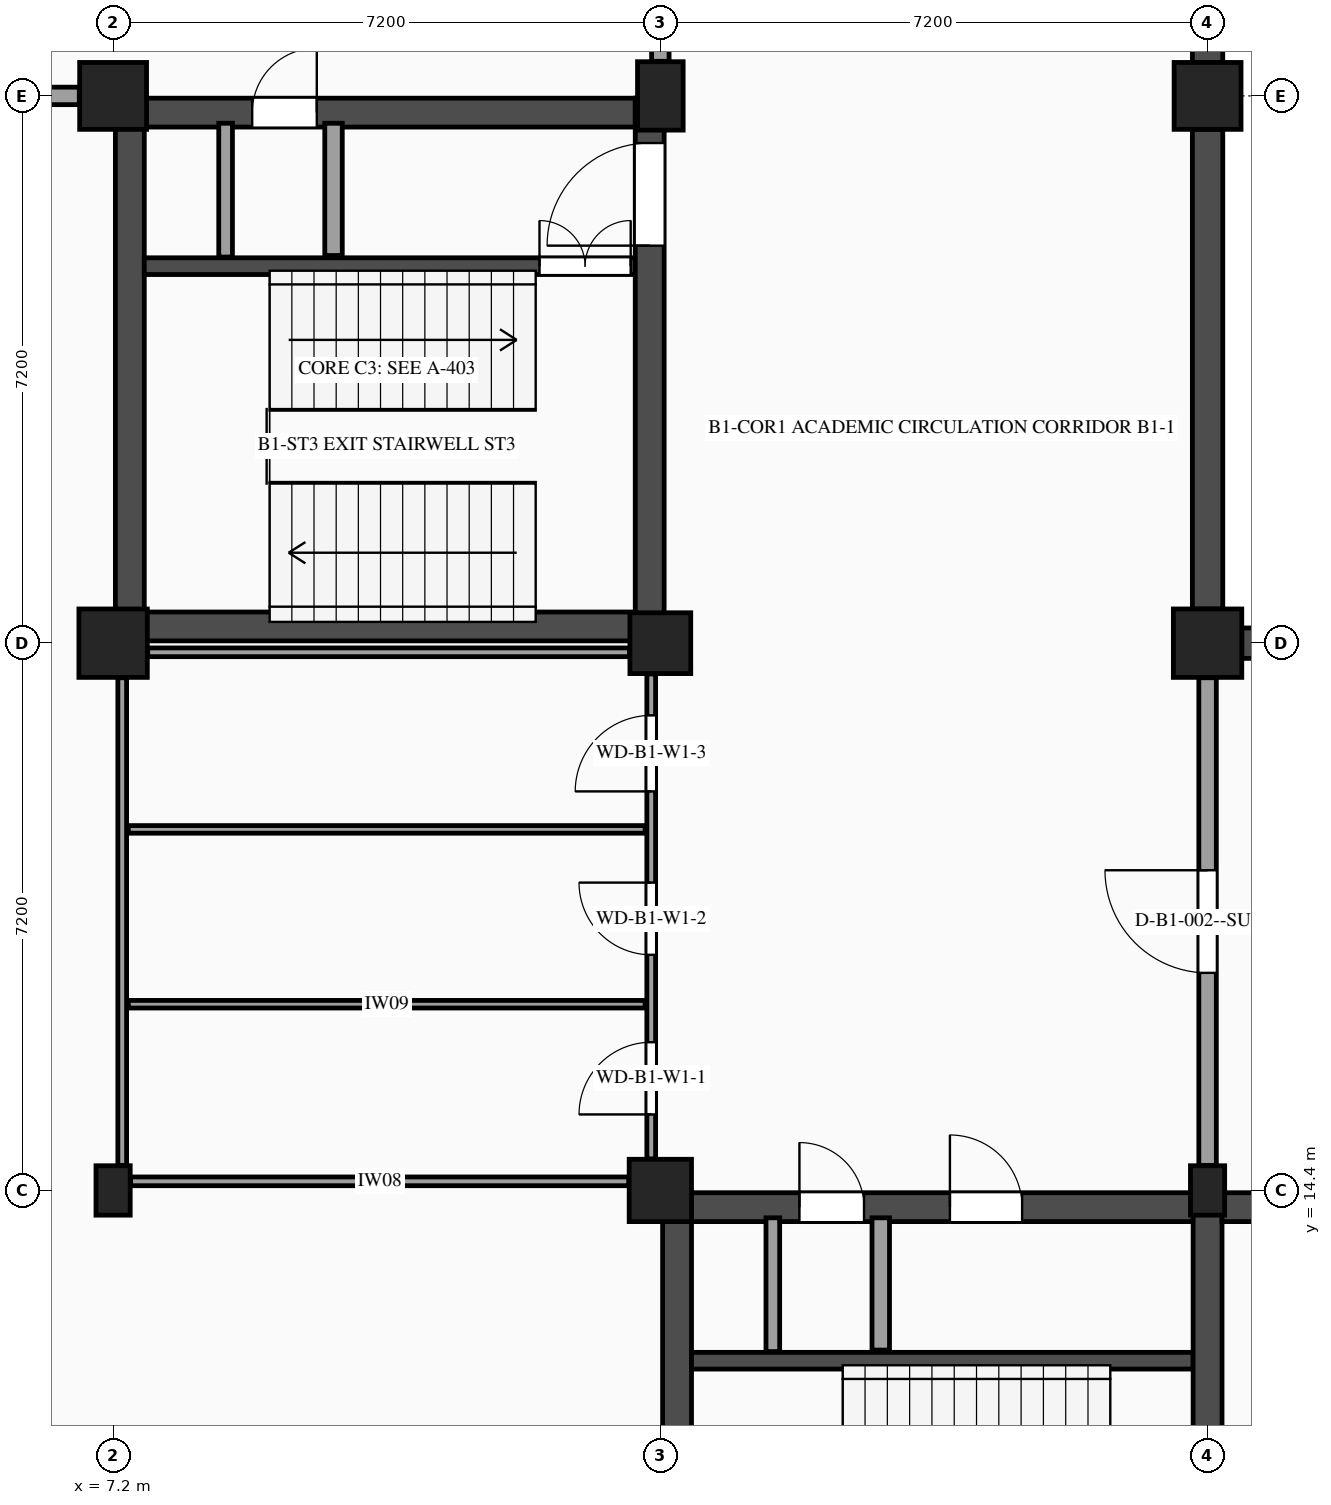
"""IFC4 building model, lengths in metres.
Left out: names, types, materials, properties, quantities, classifications, styles, units other than length and angle.
Written with IfcOpenShell. Run it as: python <this file> out.ifc"""

import sys

from ifc_helpers import new_model, si_unit, direction, frame, frame_2d, origin, origin_2d, place, context, subcontext, project, spatial, rectangle, extrude, element, fill, save


model = new_model("IFC4")
c1 = context("Model", 3, precision=1e-05, world=origin(), true_north=direction((0.0, 1.0)))
c2 = subcontext(c1, "Body", "Model", "MODEL_VIEW")
j1 = project(units=[si_unit("LENGTHUNIT", "METRE"), si_unit("PLANEANGLEUNIT", "RADIAN")], contexts=[c1])
p1 = place(None, origin())
s1 = spatial("IfcSite", under=j1, at=p1, CompositionType="ELEMENT")
p2 = place(p1, origin())
s2 = spatial("IfcBuilding", under=s1, at=p2, CompositionType="ELEMENT")
p3 = place(p2, frame((0.0, 0.0, -4.5)))
s3 = spatial("IfcBuildingStorey", under=s2, at=p3, CompositionType="ELEMENT", Elevation=-4.5)
p4 = place(p3, frame((7.2, 14.4, -0.45), z_axis=(0.0, 0.0, 1.0), x_axis=(1.0, 0.0, 0.0)))
e1 = element("IfcColumn", 1, at=p4, inside=s3, PredefinedType="PILASTER", context=c2, shape_type="SweptSolid", body=[
    extrude(rectangle(XDim=0.45, YDim=0.65, at=origin_2d()), origin(), (0.0, 0.0, 1.0), 4.95),
])
p5 = place(p3, frame((7.2, 21.6, -0.45), z_axis=(0.0, 0.0, 1.0), x_axis=(1.0, 0.0, 0.0)))
e2 = element("IfcColumn", 2, at=p5, inside=s3, PredefinedType="COLUMN", context=c2, shape_type="SweptSolid", body=[
    extrude(rectangle(XDim=0.9, YDim=0.9, at=origin_2d()), origin(), (0.0, 0.0, 1.0), 4.95),
])
p6 = place(p3, frame((7.2, 28.8, -0.45), z_axis=(0.0, 0.0, 1.0), x_axis=(1.0, 0.0, 0.0)))
e3 = element("IfcColumn", 3, at=p6, inside=s3, PredefinedType="COLUMN", context=c2, shape_type="SweptSolid", body=[
    extrude(rectangle(XDim=0.88, YDim=0.88, at=origin_2d()), origin(), (0.0, 0.0, 1.0), 4.95),
])
p7 = place(p3, frame((14.4, 14.4, -0.45), z_axis=(0.0, 0.0, 1.0), x_axis=(1.0, 0.0, 0.0)))
e4 = element("IfcColumn", 4, at=p7, inside=s3, PredefinedType="COLUMN", context=c2, shape_type="SweptSolid", body=[
    extrude(rectangle(XDim=0.82, YDim=0.82, at=origin_2d()), origin(), (0.0, 0.0, 1.0), 4.95),
])
p8 = place(p3, frame((14.4, 21.6, -0.45), z_axis=(0.0, 0.0, 1.0), x_axis=(1.0, 0.0, 0.0)))
e5 = element("IfcColumn", 5, at=p8, inside=s3, PredefinedType="COLUMN", context=c2, shape_type="SweptSolid", body=[
    extrude(rectangle(XDim=0.8, YDim=0.8, at=origin_2d()), origin(), (0.0, 0.0, 1.0), 4.95),
])
p9 = place(p3, frame((14.4, 28.8, -0.45), z_axis=(0.0, 0.0, 1.0), x_axis=(1.0, 0.0, 0.0)))
e6 = element("IfcColumn", 6, at=p9, inside=s3, PredefinedType="COLUMN", context=c2, shape_type="SweptSolid", body=[
    extrude(rectangle(XDim=0.6, YDim=0.9, at=origin_2d()), origin(), (0.0, 0.0, 1.0), 4.95),
])
p10 = place(p3, frame((21.6, 14.4, -0.45), z_axis=(0.0, 0.0, 1.0), x_axis=(1.0, 0.0, 0.0)))
e7 = element("IfcColumn", 7, at=p10, inside=s3, PredefinedType="PILASTER", context=c2, shape_type="SweptSolid", body=[
    extrude(rectangle(XDim=0.45, YDim=0.65, at=origin_2d()), origin(), (0.0, 0.0, 1.0), 4.95),
])
p11 = place(p3, frame((21.6, 21.6, -0.45), z_axis=(0.0, 0.0, 1.0), x_axis=(1.0, 0.0, 0.0)))
e8 = element("IfcColumn", 8, at=p11, inside=s3, PredefinedType="COLUMN", context=c2, shape_type="SweptSolid", body=[
    extrude(rectangle(XDim=0.9, YDim=0.9, at=origin_2d()), origin(), (0.0, 0.0, 1.0), 4.95),
])
p12 = place(p3, frame((21.6, 28.8, -0.45), z_axis=(0.0, 0.0, 1.0), x_axis=(1.0, 0.0, 0.0)))
e9 = element("IfcColumn", 9, at=p12, inside=s3, PredefinedType="COLUMN", context=c2, shape_type="SweptSolid", body=[
    extrude(rectangle(XDim=0.88, YDim=0.88, at=origin_2d()), origin(), (0.0, 0.0, 1.0), 4.95),
])
p13 = place(p3, frame((21.6, 35.59, 0.0), z_axis=(0.0, 0.0, 1.0), x_axis=(0.0, -1.0, 0.0)))
e10 = element("IfcWall", 10, at=p13, inside=s3, PredefinedType="SOLIDWALL", context=c2, shape_type="SweptSolid", body=[
    extrude(rectangle(XDim=6.35, YDim=0.4, at=frame_2d((3.175, 0.0))), origin(), (0.0, 0.0, 1.0), 4.17),
])
p14 = place(p3, frame((21.6, 28.36, 0.0), z_axis=(0.0, 0.0, 1.0), x_axis=(0.0, -1.0, 0.0)))
e11 = element("IfcWall", 11, at=p14, inside=s3, PredefinedType="SOLIDWALL", context=c2, shape_type="SweptSolid", body=[
    extrude(rectangle(XDim=6.31, YDim=0.4, at=frame_2d((3.155, 0.0))), origin(), (0.0, 0.0, 1.0), 4.17),
])
p15 = place(p3, frame((22.05, 21.6, 0.0), z_axis=(0.0, 0.0, 1.0), x_axis=(1.0, 0.0, 0.0)))
e12 = element("IfcWall", 12, at=p15, inside=s3, PredefinedType="SOLIDWALL", context=c2, shape_type="SweptSolid", body=[
    extrude(rectangle(XDim=6.35, YDim=0.4, at=frame_2d((3.175, 0.0))), origin(), (0.0, 0.0, 1.0), 4.17),
])
p16 = place(p3, frame((14.62, 14.37, 0.0), z_axis=(0.0, 0.0, 1.0), x_axis=(0.0, -1.0, 0.0)))
e13 = element("IfcWall", 13, at=p16, inside=s3, PredefinedType="SHEAR", context=c2, shape_type="SweptSolid", body=[
    extrude(rectangle(XDim=7.14, YDim=0.38, at=frame_2d((3.57, 0.0))), origin(), (0.0, 0.0, 1.0), 4.17),
])
p17 = place(p3, frame((14.81, 14.18, 0.0), z_axis=(0.0, 0.0, 1.0), x_axis=(1.0, 0.0, 0.0)))
e14 = element("IfcWall", 14, at=p17, inside=s3, PredefinedType="SHEAR", context=c2, shape_type="SweptSolid", body=[
    extrude(rectangle(XDim=6.6, YDim=0.38, at=frame_2d((3.3, 0.0))), origin(), (0.0, 0.0, 1.0), 4.17),
])
p18 = place(p17, frame((1.42, 0.0, 0.0)))
e15 = element("IfcOpeningElement", 15, at=p18, cuts=e14, PredefinedType="OPENING", context=c2, shape_type="SweptSolid", body=[
    extrude(rectangle(XDim=0.85, YDim=2.1, at=frame_2d((0.425, 1.05))), frame((0.0, 0.2, 0.0), z_axis=(0.0, -1.0, 0.0), x_axis=(1.0, 0.0, 0.0)), (0.0, 0.0, 1.0), 0.4),
])
p19 = place(p17, frame((3.4, 0.0, 0.0)))
e16 = element("IfcOpeningElement", 16, at=p19, cuts=e14, PredefinedType="OPENING", context=c2, shape_type="SweptSolid", body=[
    extrude(rectangle(XDim=0.95, YDim=2.15, at=frame_2d((0.475, 1.075))), frame((0.0, 0.2, 0.0), z_axis=(0.0, -1.0, 0.0), x_axis=(1.0, 0.0, 0.0)), (0.0, 0.0, 1.0), 0.4),
])
p20 = place(p3, frame((14.81, 12.16, 0.0), z_axis=(0.0, 0.0, 1.0), x_axis=(1.0, 0.0, 0.0)))
e17 = element("IfcWall", 17, at=p20, inside=s3, PredefinedType="SHEAR", context=c2, shape_type="SweptSolid", body=[
    extrude(rectangle(XDim=6.6, YDim=0.22, at=frame_2d((3.3, 0.0))), origin(), (0.0, 0.0, 1.0), 4.17),
])
p21 = place(p3, frame((17.3, 12.3, 0.0), z_axis=(0.0, 0.0, 1.0), x_axis=(0.0, 1.0, 0.0)))
e18 = element("IfcWall", 18, at=p21, inside=s3, PredefinedType="PARTITIONING", context=c2, shape_type="SweptSolid", body=[
    extrude(rectangle(XDim=1.74, YDim=0.23, at=frame_2d((0.87, 0.0))), origin(), (0.0, 0.0, 1.0), 4.17),
])
p22 = place(p3, frame((15.88, 12.28, 0.0), z_axis=(0.0, 0.0, 1.0), x_axis=(0.0, 1.0, 0.0)))
e19 = element("IfcWall", 19, at=p22, inside=s3, PredefinedType="PARTITIONING", context=c2, shape_type="SweptSolid", body=[
    extrude(rectangle(XDim=1.76, YDim=0.18, at=frame_2d((0.88, 0.0))), origin(), (0.0, 0.0, 1.0), 4.17),
])
p23 = place(p3, frame((21.6, 7.23, 0.0), z_axis=(0.0, 0.0, 1.0), x_axis=(0.0, 1.0, 0.0)))
e20 = element("IfcWall", 20, at=p23, inside=s3, PredefinedType="SHEAR", context=c2, shape_type="SweptSolid", body=[
    extrude(rectangle(XDim=7.14, YDim=0.38, at=frame_2d((3.57, 0.0))), origin(), (0.0, 0.0, 1.0), 4.17),
])
p24 = place(p23, frame((1.4, 0.0, 0.0)))
e21 = element("IfcOpeningElement", 21, at=p24, cuts=e20, PredefinedType="OPENING", context=c2, shape_type="SweptSolid", body=[
    extrude(rectangle(XDim=1.8, YDim=2.2, at=frame_2d((0.9, 1.1))), frame((0.0, 0.2, 0.0), z_axis=(0.0, -1.0, 0.0), x_axis=(1.0, 0.0, 0.0)), (0.0, 0.0, 1.0), 0.4),
])
p25 = place(p3, frame((21.79, 14.18, 0.0), z_axis=(0.0, 0.0, 1.0), x_axis=(1.0, 0.0, 0.0)))
e22 = element("IfcWall", 22, at=p25, inside=s3, PredefinedType="SHEAR", context=c2, shape_type="SweptSolid", body=[
    extrude(rectangle(XDim=6.6, YDim=0.38, at=frame_2d((3.3, 0.0))), origin(), (0.0, 0.0, 1.0), 4.17),
])
p26 = place(p3, frame((7.61, 21.82, 0.0), z_axis=(0.0, 0.0, 1.0), x_axis=(1.0, 0.0, 0.0)))
e23 = element("IfcWall", 23, at=p26, inside=s3, PredefinedType="SHEAR", context=c2, shape_type="SweptSolid", body=[
    extrude(rectangle(XDim=6.46, YDim=0.38, at=frame_2d((3.23, 0.0))), origin(), (0.0, 0.0, 1.0), 4.17),
])
p27 = place(p3, frame((7.42, 28.77, 0.0), z_axis=(0.0, 0.0, 1.0), x_axis=(0.0, -1.0, 0.0)))
e24 = element("IfcWall", 24, at=p27, inside=s3, PredefinedType="SHEAR", context=c2, shape_type="SweptSolid", body=[
    extrude(rectangle(XDim=7.14, YDim=0.38, at=frame_2d((3.57, 0.0))), origin(), (0.0, 0.0, 1.0), 4.17),
])
p28 = place(p3, frame((7.61, 28.58, 0.0), z_axis=(0.0, 0.0, 1.0), x_axis=(1.0, 0.0, 0.0)))
e25 = element("IfcWall", 25, at=p28, inside=s3, PredefinedType="SHEAR", context=c2, shape_type="SweptSolid", body=[
    extrude(rectangle(XDim=6.46, YDim=0.38, at=frame_2d((3.23, 0.0))), origin(), (0.0, 0.0, 1.0), 4.17),
])
p29 = place(p28, frame((1.42, 0.0, 0.0)))
e26 = element("IfcOpeningElement", 26, at=p29, cuts=e25, PredefinedType="OPENING", context=c2, shape_type="SweptSolid", body=[
    extrude(rectangle(XDim=0.85, YDim=2.1, at=frame_2d((0.425, 1.05))), frame((0.0, 0.2, 0.0), z_axis=(0.0, -1.0, 0.0), x_axis=(1.0, 0.0, 0.0)), (0.0, 0.0, 1.0), 0.4),
])
p30 = place(p3, frame((7.61, 26.56, 0.0), z_axis=(0.0, 0.0, 1.0), x_axis=(1.0, 0.0, 0.0)))
e27 = element("IfcWall", 27, at=p30, inside=s3, PredefinedType="SHEAR", context=c2, shape_type="SweptSolid", body=[
    extrude(rectangle(XDim=6.46, YDim=0.22, at=frame_2d((3.23, 0.0))), origin(), (0.0, 0.0, 1.0), 4.17),
])
p31 = place(p30, frame((5.2, 0.0, 0.0)))
e28 = element("IfcOpeningElement", 28, at=p31, cuts=e27, PredefinedType="OPENING", context=c2, shape_type="SweptSolid", body=[
    extrude(rectangle(XDim=1.2, YDim=2.2, at=frame_2d((0.6, 1.1))), frame((0.0, 0.12, 0.0), z_axis=(0.0, -1.0, 0.0), x_axis=(1.0, 0.0, 0.0)), (0.0, 0.0, 1.0), 0.24),
])
p32 = place(p3, frame((10.1, 26.7, 0.0), z_axis=(0.0, 0.0, 1.0), x_axis=(0.0, 1.0, 0.0)))
e29 = element("IfcWall", 29, at=p32, inside=s3, PredefinedType="PARTITIONING", context=c2, shape_type="SweptSolid", body=[
    extrude(rectangle(XDim=1.74, YDim=0.23, at=frame_2d((0.87, 0.0))), origin(), (0.0, 0.0, 1.0), 4.17),
])
p33 = place(p3, frame((8.68, 26.68, 0.0), z_axis=(0.0, 0.0, 1.0), x_axis=(0.0, 1.0, 0.0)))
e30 = element("IfcWall", 30, at=p33, inside=s3, PredefinedType="PARTITIONING", context=c2, shape_type="SweptSolid", body=[
    extrude(rectangle(XDim=1.76, YDim=0.18, at=frame_2d((0.88, 0.0))), origin(), (0.0, 0.0, 1.0), 4.17),
])
p34 = place(p3, frame((14.26, 21.63, 0.0), z_axis=(0.0, 0.0, 1.0), x_axis=(0.0, 1.0, 0.0)))
e31 = element("IfcWall", 31, at=p34, inside=s3, PredefinedType="SHEAR", context=c2, shape_type="SweptSolid", body=[
    extrude(rectangle(XDim=7.14, YDim=0.38, at=frame_2d((3.57, 0.0))), origin(), (0.0, 0.0, 1.0), 4.17),
])
p35 = place(p34, frame((5.2, 0.0, 0.0)))
e32 = element("IfcOpeningElement", 32, at=p35, cuts=e31, PredefinedType="OPENING", context=c2, shape_type="SweptSolid", body=[
    extrude(rectangle(XDim=1.35, YDim=2.15, at=frame_2d((0.675, 1.075))), frame((0.0, 0.2, 0.0), z_axis=(0.0, -1.0, 0.0), x_axis=(1.0, 0.0, 0.0)), (0.0, 0.0, 1.0), 0.4),
])
p36 = place(p3, frame((7.43, 14.52, 0.0), z_axis=(0.0, 0.0, 1.0), x_axis=(1.0, 0.0, 0.0)))
e33 = element("IfcWall", 33, at=p36, inside=s3, PredefinedType="PARTITIONING", context=c2, shape_type="SweptSolid", body=[
    extrude(rectangle(XDim=6.555, YDim=0.115, at=frame_2d((3.278, 0.0))), origin(), (0.0, 0.0, 1.0), 3.39),
])
p37 = place(p3, frame((7.655, 21.48, 0.0), z_axis=(0.0, 0.0, 1.0), x_axis=(1.0, 0.0, 0.0)))
e34 = element("IfcWall", 34, at=p37, inside=s3, PredefinedType="PARTITIONING", context=c2, shape_type="SweptSolid", body=[
    extrude(rectangle(XDim=6.34, YDim=0.115, at=frame_2d((3.17, 0.0))), origin(), (0.0, 0.0, 1.0), 3.39),
])
p38 = place(p3, frame((7.32, 14.73, 0.0), z_axis=(0.0, 0.0, 1.0), x_axis=(0.0, 1.0, 0.0)))
e35 = element("IfcWall", 35, at=p38, inside=s3, PredefinedType="PARTITIONING", context=c2, shape_type="SweptSolid", body=[
    extrude(rectangle(XDim=6.415, YDim=0.115, at=frame_2d((3.208, 0.0))), origin(), (0.0, 0.0, 1.0), 3.485),
])
p39 = place(p3, frame((14.28, 14.815, 0.0), z_axis=(0.0, 0.0, 1.0), x_axis=(0.0, 1.0, 0.0)))
e36 = element("IfcWall", 36, at=p39, inside=s3, PredefinedType="PARTITIONING", context=c2, shape_type="SweptSolid", body=[
    extrude(rectangle(XDim=6.38, YDim=0.115, at=frame_2d((3.19, 0.0))), origin(), (0.0, 0.0, 1.0), 3.485),
])
p40 = place(p39, frame((0.585, 0.0, 0.0)))
e37 = element("IfcOpeningElement", 37, at=p40, cuts=e36, PredefinedType="OPENING", context=c2, shape_type="SweptSolid", body=[
    extrude(rectangle(XDim=0.95, YDim=2.1, at=frame_2d((0.475, 1.05))), frame((0.0, 0.067, 0.0), z_axis=(0.0, -1.0, 0.0), x_axis=(1.0, 0.0, 0.0)), (0.0, 0.0, 1.0), 0.135),
])
p41 = place(p39, frame((2.685, 0.0, 0.0)))
e38 = element("IfcOpeningElement", 38, at=p41, cuts=e36, PredefinedType="OPENING", context=c2, shape_type="SweptSolid", body=[
    extrude(rectangle(XDim=0.95, YDim=2.1, at=frame_2d((0.475, 1.05))), frame((0.0, 0.067, 0.0), z_axis=(0.0, -1.0, 0.0), x_axis=(1.0, 0.0, 0.0)), (0.0, 0.0, 1.0), 0.135),
])
p42 = place(p39, frame((4.835, 0.0, 0.0)))
e39 = element("IfcOpeningElement", 39, at=p42, cuts=e36, PredefinedType="OPENING", context=c2, shape_type="SweptSolid", body=[
    extrude(rectangle(XDim=1.0, YDim=2.15, at=frame_2d((0.5, 1.075))), frame((0.0, 0.067, 0.0), z_axis=(0.0, -1.0, 0.0), x_axis=(1.0, 0.0, 0.0)), (0.0, 0.0, 1.0), 0.135),
])
for number, where, z_axis, x_axis in (
    (40, (7.4, 16.85, 0.0), (0.0, 0.0, 1.0), (1.0, 0.0, 0.0)),
    (41, (7.4, 19.15, 0.0), (0.0, 0.0, 1.0), (1.0, 0.0, 0.0)),
):
    element("IfcWall", number, at=place(p3, frame(where, z_axis=z_axis, x_axis=x_axis)), inside=s3, PredefinedType="PARTITIONING", context=c2, shape_type="SweptSolid", body=[
        extrude(rectangle(XDim=6.8, YDim=0.1, at=frame_2d((3.4, 0.0))), origin(), (0.0, 0.0, 1.0), 4.17),
    ])
p43 = place(p3, frame((0.305, 28.8, 0.0), z_axis=(0.0, 0.0, 1.0), x_axis=(1.0, 0.0, 0.0)))
e42 = element("IfcWall", 42, at=p43, inside=s3, PredefinedType="PARTITIONING", context=c2, shape_type="SweptSolid", body=[
    extrude(rectangle(XDim=6.45, YDim=0.23, at=frame_2d((3.225, 0.0))), origin(), (0.0, 0.0, 1.0), 3.37),
])
p44 = place(p3, frame((14.4, 29.255, 0.0), z_axis=(0.0, 0.0, 1.0), x_axis=(0.0, 1.0, 0.0)))
e43 = element("IfcWall", 43, at=p44, inside=s3, PredefinedType="PARTITIONING", context=c2, shape_type="SweptSolid", body=[
    extrude(rectangle(XDim=6.415, YDim=0.23, at=frame_2d((3.208, 0.0))), origin(), (0.0, 0.0, 1.0), 3.48),
])
p45 = place(p44, frame((2.532, 0.0, 0.0)))
e44 = element("IfcOpeningElement", 44, at=p45, cuts=e43, PredefinedType="OPENING", context=c2, shape_type="SweptSolid", body=[
    extrude(rectangle(XDim=1.35, YDim=2.15, at=frame_2d((0.675, 1.075))), frame((0.0, 0.125, 0.0), z_axis=(0.0, -1.0, 0.0), x_axis=(1.0, 0.0, 0.0)), (0.0, 0.0, 1.0), 0.25),
])
p46 = place(p3, frame((21.6, 14.73, 0.0), z_axis=(0.0, 0.0, 1.0), x_axis=(0.0, 1.0, 0.0)))
e45 = element("IfcWall", 45, at=p46, inside=s3, PredefinedType="PARTITIONING", context=c2, shape_type="SweptSolid", body=[
    extrude(rectangle(XDim=6.415, YDim=0.23, at=frame_2d((3.208, 0.0))), origin(), (0.0, 0.0, 1.0), 3.485),
])
p47 = place(p46, frame((2.532, 0.0, 0.0)))
e46 = element("IfcOpeningElement", 46, at=p47, cuts=e45, PredefinedType="OPENING", context=c2, shape_type="SweptSolid", body=[
    extrude(rectangle(XDim=1.35, YDim=2.15, at=frame_2d((0.675, 1.075))), frame((0.0, 0.125, 0.0), z_axis=(0.0, -1.0, 0.0), x_axis=(1.0, 0.0, 0.0)), (0.0, 0.0, 1.0), 0.25),
])
p48 = place(p18, origin())
e47 = element("IfcDoor", 47, at=p48, inside=s3, OperationType="SINGLE_SWING_LEFT", PredefinedType="DOOR", context=c2, shape_type="SweptSolid", body=[
    extrude(rectangle(XDim=0.85, YDim=2.1, at=frame_2d((0.425, 1.05))), frame((0.0, 0.025, 0.0), z_axis=(0.0, -1.0, 0.0), x_axis=(1.0, 0.0, 0.0)), (0.0, 0.0, 1.0), 0.05),
])
fill(e15, e47)
p49 = place(p19, origin())
e48 = element("IfcDoor", 48, at=p49, inside=s3, OperationType="SINGLE_SWING_LEFT", PredefinedType="DOOR", context=c2, shape_type="SweptSolid", body=[
    extrude(rectangle(XDim=0.95, YDim=2.15, at=frame_2d((0.475, 1.075))), frame((0.0, 0.025, 0.0), z_axis=(0.0, -1.0, 0.0), x_axis=(1.0, 0.0, 0.0)), (0.0, 0.0, 1.0), 0.05),
])
fill(e16, e48)
p50 = place(p29, origin())
e49 = element("IfcDoor", 49, at=p50, inside=s3, OperationType="SINGLE_SWING_RIGHT", PredefinedType="DOOR", context=c2, shape_type="SweptSolid", body=[
    extrude(rectangle(XDim=0.85, YDim=2.1, at=frame_2d((0.425, 1.05))), frame((0.0, 0.025, 0.0), z_axis=(0.0, -1.0, 0.0), x_axis=(1.0, 0.0, 0.0)), (0.0, 0.0, 1.0), 0.05),
])
fill(e26, e49)
p51 = place(p31, origin())
e50 = element("IfcDoor", 50, at=p51, inside=s3, OperationType="DOUBLE_DOOR_SINGLE_SWING", PredefinedType="DOOR", context=c2, shape_type="SweptSolid", body=[
    extrude(rectangle(XDim=1.2, YDim=2.2, at=frame_2d((0.6, 1.1))), frame((0.0, 0.025, 0.0), z_axis=(0.0, -1.0, 0.0), x_axis=(1.0, 0.0, 0.0)), (0.0, 0.0, 1.0), 0.05),
])
fill(e28, e50)
p52 = place(p35, origin())
e51 = element("IfcDoor", 51, at=p52, inside=s3, OperationType="SINGLE_SWING_LEFT", PredefinedType="DOOR", context=c2, shape_type="SweptSolid", body=[
    extrude(rectangle(XDim=1.35, YDim=2.15, at=frame_2d((0.675, 1.075))), frame((0.0, 0.025, 0.0), z_axis=(0.0, -1.0, 0.0), x_axis=(1.0, 0.0, 0.0)), (0.0, 0.0, 1.0), 0.05),
])
fill(e32, e51)
p53 = place(p40, origin())
e52 = element("IfcDoor", 52, at=p53, inside=s3, OperationType="SINGLE_SWING_LEFT", PredefinedType="DOOR", context=c2, shape_type="SweptSolid", body=[
    extrude(rectangle(XDim=0.95, YDim=2.1, at=frame_2d((0.475, 1.05))), frame((0.0, 0.025, 0.0), z_axis=(0.0, -1.0, 0.0), x_axis=(1.0, 0.0, 0.0)), (0.0, 0.0, 1.0), 0.05),
])
fill(e37, e52)
p54 = place(p41, origin())
e53 = element("IfcDoor", 53, at=p54, inside=s3, OperationType="SINGLE_SWING_RIGHT", PredefinedType="DOOR", context=c2, shape_type="SweptSolid", body=[
    extrude(rectangle(XDim=0.95, YDim=2.1, at=frame_2d((0.475, 1.05))), frame((0.0, 0.025, 0.0), z_axis=(0.0, -1.0, 0.0), x_axis=(1.0, 0.0, 0.0)), (0.0, 0.0, 1.0), 0.05),
])
fill(e38, e53)
p55 = place(p42, origin())
e54 = element("IfcDoor", 54, at=p55, inside=s3, OperationType="SINGLE_SWING_LEFT", PredefinedType="DOOR", context=c2, shape_type="SweptSolid", body=[
    extrude(rectangle(XDim=1.0, YDim=2.15, at=frame_2d((0.5, 1.075))), frame((0.0, 0.025, 0.0), z_axis=(0.0, -1.0, 0.0), x_axis=(1.0, 0.0, 0.0)), (0.0, 0.0, 1.0), 0.05),
])
fill(e39, e54)
p56 = place(p47, origin())
e55 = element("IfcDoor", 55, at=p56, inside=s3, OperationType="SINGLE_SWING_RIGHT", PredefinedType="DOOR", context=c2, shape_type="SweptSolid", body=[
    extrude(rectangle(XDim=1.35, YDim=2.15, at=frame_2d((0.675, 1.075))), frame((0.0, 0.025, 0.0), z_axis=(0.0, -1.0, 0.0), x_axis=(1.0, 0.0, 0.0)), (0.0, 0.0, 1.0), 0.05),
])
fill(e46, e55)
save(model, sys.argv[1])
